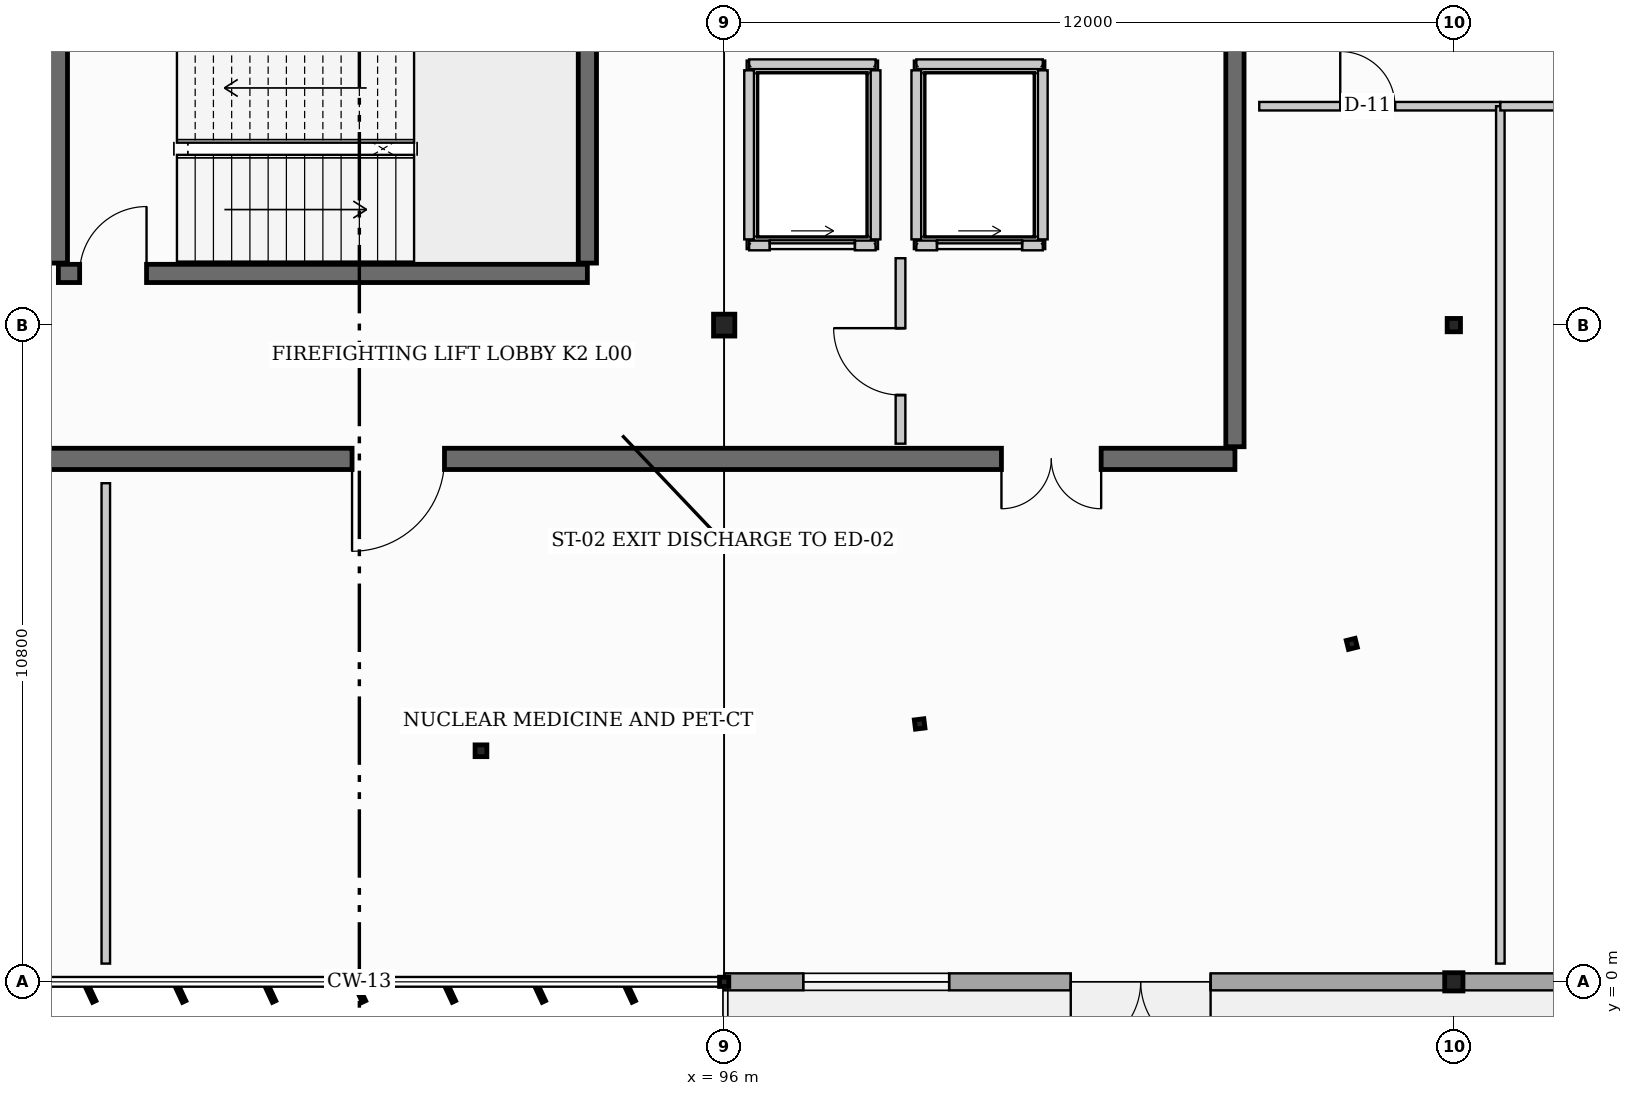
"""IFC4 building model, lengths in metres.
Left out: names, types, materials, properties, quantities, classifications, styles, units other than length and angle.
Written with IfcOpenShell. Run it as: python <this file> out.ifc"""

import sys

from ifc_helpers import new_model, si_unit, direction, frame, frame_2d, origin, origin_2d, place, context, subcontext, project, spatial, rectangle, hollow_rectangle, hollow_circle, i_section, extrude, element, fill, save


model = new_model("IFC4")
c1 = context("Model", 3, precision=1e-05, world=origin(), true_north=direction((0.0, 1.0)))
c2 = subcontext(c1, "Body", "Model", "MODEL_VIEW")
j1 = project(units=[si_unit("LENGTHUNIT", "METRE"), si_unit("PLANEANGLEUNIT", "RADIAN")], contexts=[c1])
p1 = place(None, origin())
s1 = spatial("IfcSite", under=j1, at=p1, CompositionType="ELEMENT")
p2 = place(p1, origin())
s2 = spatial("IfcBuilding", under=s1, at=p2, CompositionType="ELEMENT")
p3 = place(p2, origin())
s3 = spatial("IfcBuildingStorey", under=s2, at=p3, CompositionType="ELEMENT", Elevation=0.0)
p4 = place(p3, frame((96.0, 0.0, 0.0), z_axis=(0.0, 0.0, 1.0), x_axis=(1.0, 0.0, 0.0)))
e1 = element("IfcColumn", 1, at=p4, inside=s3, PredefinedType="COLUMN", context=c2, shape_type="SweptSolid", body=[
    extrude(i_section(OverallWidth=0.152, OverallDepth=0.152, WebThickness=0.006, FlangeThickness=0.007, at=origin_2d()), origin(), (0.0, 0.0, 1.0), 4.8),
])
p5 = place(p3, frame((96.0, 10.8, 0.0), z_axis=(0.0, 0.0, 1.0), x_axis=(1.0, 0.0, 0.0)))
e2 = element("IfcColumn", 2, at=p5, inside=s3, PredefinedType="COLUMN", context=c2, shape_type="SweptSolid", body=[
    extrude(i_section(OverallWidth=0.35, OverallDepth=0.36, WebThickness=0.016, FlangeThickness=0.028, at=origin_2d()), origin(), (0.0, 0.0, 1.0), 4.8),
])
p6 = place(p3, frame((108.0, 0.0, 0.0), z_axis=(0.0, 0.0, 1.0), x_axis=(0.0, 1.0, 0.0)))
e3 = element("IfcColumn", 3, at=p6, inside=s3, PredefinedType="COLUMN", context=c2, shape_type="SweptSolid", body=[
    extrude(hollow_rectangle(XDim=0.3, YDim=0.3, WallThickness=0.012, at=origin_2d()), origin(), (0.0, 0.0, 1.0), 4.8),
])
p7 = place(p3, frame((108.0, 10.8, 0.0), z_axis=(0.0, 0.0, 1.0), x_axis=(0.0, 1.0, 0.0)))
e4 = element("IfcColumn", 4, at=p7, inside=s3, PredefinedType="COLUMN", context=c2, shape_type="SweptSolid", body=[
    extrude(hollow_circle(Radius=0.11, WallThickness=0.01, at=origin_2d()), origin(), (0.0, 0.0, 1.0), 4.8),
])
p8 = place(p3, frame((92.0, 3.8, 0.0), z_axis=(0.0, 0.0, 1.0), x_axis=(0.0, 1.0, 0.0)))
e5 = element("IfcColumn", 5, at=p8, inside=s3, PredefinedType="COLUMN", context=c2, shape_type="SweptSolid", body=[
    extrude(hollow_circle(Radius=0.097, WallThickness=0.008, at=origin_2d()), origin(), (0.0, 0.0, 1.0), 4.8),
])
p9 = place(p3, frame((99.215, 4.241, 0.0), z_axis=(0.0, 0.0, 1.0), x_axis=(-0.121869343405, 0.992546151641, 0.0)))
e6 = element("IfcColumn", 6, at=p9, inside=s3, PredefinedType="COLUMN", context=c2, shape_type="SweptSolid", body=[
    extrude(i_section(OverallWidth=0.153, OverallDepth=0.158, WebThickness=0.007, FlangeThickness=0.01, at=origin_2d()), origin(), (0.0, 0.0, 1.0), 4.8),
])
p10 = place(p3, frame((106.322, 5.558, 0.0), z_axis=(0.0, 0.0, 1.0), x_axis=(-0.2419218956, 0.970295726276, 0.0)))
e7 = element("IfcColumn", 7, at=p10, inside=s3, PredefinedType="COLUMN", context=c2, shape_type="SweptSolid", body=[
    extrude(hollow_rectangle(XDim=0.15, YDim=0.15, WallThickness=0.008, at=origin_2d()), origin(), (0.0, 0.0, 1.0), 4.8),
])
p11 = place(p3, frame((104.4, 8.6, 0.0), z_axis=(0.0, 0.0, 1.0), x_axis=(-1.0, 0.0, 0.0)))
e8 = element("IfcWall", 8, at=p11, inside=s3, PredefinedType="SHEAR", context=c2, shape_type="SweptSolid", body=[
    extrude(rectangle(XDim=20.4, YDim=0.35, at=frame_2d((10.2, 0.0))), origin(), (0.0, 0.0, 1.0), 4.8),
])
p12 = place(p11, frame((2.2, 0.0, 0.0)))
e9 = element("IfcOpeningElement", 9, at=p12, cuts=e8, PredefinedType="OPENING", context=c2, shape_type="SweptSolid", body=[
    extrude(rectangle(XDim=1.64, YDim=2.2, at=frame_2d((0.82, 1.1))), frame((0.0, 0.185, 0.0), z_axis=(0.0, -1.0, 0.0), x_axis=(1.0, 0.0, 0.0)), (0.0, 0.0, 1.0), 0.37),
])
p13 = place(p11, frame((13.0, 0.0, 0.0)))
e10 = element("IfcOpeningElement", 10, at=p13, cuts=e8, PredefinedType="OPENING", context=c2, shape_type="SweptSolid", body=[
    extrude(rectangle(XDim=1.52, YDim=2.16, at=frame_2d((0.76, 1.08))), frame((0.0, 0.185, 0.0), z_axis=(0.0, -1.0, 0.0), x_axis=(1.0, 0.0, 0.0)), (0.0, 0.0, 1.0), 0.37),
])
p14 = place(p3, frame((104.4, 19.4, 0.0), z_axis=(0.0, 0.0, 1.0), x_axis=(0.0, -1.0, 0.0)))
e11 = element("IfcWall", 11, at=p14, inside=s3, PredefinedType="SHEAR", context=c2, shape_type="SweptSolid", body=[
    extrude(rectangle(XDim=10.6, YDim=0.3, at=frame_2d((5.3, 0.0))), origin(), (0.0, 0.0, 1.0), 4.8),
])
p15 = place(p3, frame((85.05, 11.65, 0.0), z_axis=(0.0, 0.0, 1.0), x_axis=(1.0, 0.0, 0.0)))
e12 = element("IfcWall", 12, at=p15, inside=s3, PredefinedType="SHEAR", context=c2, shape_type="SweptSolid", body=[
    extrude(rectangle(XDim=8.7, YDim=0.3, at=frame_2d((4.35, 0.0))), origin(), (0.0, 0.0, 1.0), 4.8),
])
p16 = place(p15, frame((0.35, 0.0, 0.0)))
e13 = element("IfcOpeningElement", 13, at=p16, cuts=e12, PredefinedType="OPENING", context=c2, shape_type="SweptSolid", body=[
    extrude(rectangle(XDim=1.1, YDim=2.15, at=frame_2d((0.55, 1.075))), frame((0.0, 0.16, 0.0), z_axis=(0.0, -1.0, 0.0), x_axis=(1.0, 0.0, 0.0)), (0.0, 0.0, 1.0), 0.32),
])
for number, where, z_axis, x_axis in (
    (14, (85.05, 11.82, 0.0), (0.0, 0.0, 1.0), (0.0, 1.0, 0.0)),
    (15, (93.75, 11.82, 0.0), (0.0, 0.0, 1.0), (0.0, 1.0, 0.0)),
):
    element("IfcWall", number, at=place(p3, frame(where, z_axis=z_axis, x_axis=x_axis)), inside=s3, PredefinedType="SHEAR", context=c2, shape_type="SweptSolid", body=[
        extrude(rectangle(XDim=3.76, YDim=0.3, at=frame_2d((1.88, 0.0))), origin(), (0.0, 0.0, 1.0), 4.8),
    ])
p17 = place(p3, frame((132.0, 0.0, 0.0), z_axis=(0.0, 0.0, 1.0), x_axis=(-1.0, 0.0, 0.0)))
e16 = element("IfcWall", 16, at=p17, inside=s3, PredefinedType="STANDARD", context=c2, shape_type="SweptSolid", body=[
    extrude(rectangle(XDim=36.0, YDim=0.28, at=frame_2d((18.0, 0.0))), origin(), (0.0, 0.0, 1.0), 3.53),
])
p18 = place(p17, frame((5.0, 0.0, 0.0)))
e17 = element("IfcOpeningElement", 17, at=p18, cuts=e16, PredefinedType="OPENING", context=c2, shape_type="SweptSolid", body=[
    extrude(rectangle(XDim=2.3, YDim=2.3, at=frame_2d((1.15, 1.15))), frame((0.0, 0.15, 0.0), z_axis=(0.0, -1.0, 0.0), x_axis=(1.0, 0.0, 0.0)), (0.0, 0.0, 1.0), 0.3),
])
p19 = place(p17, frame((16.5, 0.0, 0.0)))
e18 = element("IfcOpeningElement", 18, at=p19, cuts=e16, PredefinedType="OPENING", context=c2, shape_type="SweptSolid", body=[
    extrude(rectangle(XDim=2.3, YDim=2.3, at=frame_2d((1.15, 1.15))), frame((0.0, 0.15, 0.0), z_axis=(0.0, -1.0, 0.0), x_axis=(1.0, 0.0, 0.0)), (0.0, 0.0, 1.0), 0.3),
])
p20 = place(p17, frame((28.0, 0.0, 0.0)))
e19 = element("IfcOpeningElement", 19, at=p20, cuts=e16, PredefinedType="OPENING", context=c2, shape_type="SweptSolid", body=[
    extrude(rectangle(XDim=2.3, YDim=2.3, at=frame_2d((1.15, 1.15))), frame((0.0, 0.15, 0.0), z_axis=(0.0, -1.0, 0.0), x_axis=(1.0, 0.0, 0.0)), (0.0, 0.0, 1.0), 0.3),
])
p21 = place(p17, frame((1.1, 0.0, 0.95)))
e20 = element("IfcOpeningElement", 20, at=p21, cuts=e16, PredefinedType="OPENING", context=c2, shape_type="SweptSolid", body=[
    extrude(rectangle(XDim=2.4, YDim=0.9, at=frame_2d((1.2, 0.45))), frame((0.0, 0.15, 0.0), z_axis=(0.0, -1.0, 0.0), x_axis=(1.0, 0.0, 0.0)), (0.0, 0.0, 1.0), 0.3),
])
p22 = place(p17, frame((32.3, 0.0, 0.95)))
e21 = element("IfcOpeningElement", 21, at=p22, cuts=e16, PredefinedType="OPENING", context=c2, shape_type="SweptSolid", body=[
    extrude(rectangle(XDim=2.4, YDim=0.9, at=frame_2d((1.2, 0.45))), frame((0.0, 0.15, 0.0), z_axis=(0.0, -1.0, 0.0), x_axis=(1.0, 0.0, 0.0)), (0.0, 0.0, 1.0), 0.3),
])
p23 = place(p3, frame((96.41, 12.11, 0.0), z_axis=(0.0, 0.0, 1.0), x_axis=(1.0, 0.0, 0.0)))
e22 = element("IfcWall", 22, at=p23, inside=s3, PredefinedType="PARTITIONING", context=c2, shape_type="SweptSolid", body=[
    extrude(rectangle(XDim=2.08, YDim=0.16, at=frame_2d((1.04, 0.0))), origin(), (0.0, 0.0, 1.0), 4.445),
])
p24 = place(p23, frame((0.34, 0.0, 0.0)))
e23 = element("IfcOpeningElement", 23, at=p24, cuts=e22, PredefinedType="OPENING", context=c2, shape_type="SweptSolid", body=[
    extrude(rectangle(XDim=1.4, YDim=2.2, at=frame_2d((0.7, 1.1))), frame((0.0, 0.09, 0.0), z_axis=(0.0, -1.0, 0.0), x_axis=(1.0, 0.0, 0.0)), (0.0, 0.0, 1.0), 0.18),
])
p25 = place(p3, frame((98.49, 15.09, 0.0), z_axis=(0.0, 0.0, 1.0), x_axis=(-1.0, 0.0, 0.0)))
e24 = element("IfcWall", 24, at=p25, inside=s3, PredefinedType="PARTITIONING", context=c2, shape_type="SweptSolid", body=[
    extrude(rectangle(XDim=2.08, YDim=0.16, at=frame_2d((1.04, 0.0))), origin(), (0.0, 0.0, 1.0), 4.445),
])
for number, where, z_axis, x_axis in (
    (25, (96.41, 14.99, 0.0), (0.0, 0.0, 1.0), (0.0, -1.0, 0.0)),
    (26, (98.49, 12.21, 0.0), (0.0, 0.0, 1.0), (0.0, 1.0, 0.0)),
):
    element("IfcWall", number, at=place(p3, frame(where, z_axis=z_axis, x_axis=x_axis)), inside=s3, PredefinedType="PARTITIONING", context=c2, shape_type="SweptSolid", body=[
        extrude(rectangle(XDim=2.78, YDim=0.16, at=frame_2d((1.39, 0.0))), origin(), (0.0, 0.0, 1.0), 4.445),
    ])
p26 = place(p3, frame((99.16, 12.11, 0.0), z_axis=(0.0, 0.0, 1.0), x_axis=(1.0, 0.0, 0.0)))
e27 = element("IfcWall", 27, at=p26, inside=s3, PredefinedType="PARTITIONING", context=c2, shape_type="SweptSolid", body=[
    extrude(rectangle(XDim=2.08, YDim=0.16, at=frame_2d((1.04, 0.0))), origin(), (0.0, 0.0, 1.0), 4.445),
])
p27 = place(p26, frame((0.34, 0.0, 0.0)))
e28 = element("IfcOpeningElement", 28, at=p27, cuts=e27, PredefinedType="OPENING", context=c2, shape_type="SweptSolid", body=[
    extrude(rectangle(XDim=1.4, YDim=2.2, at=frame_2d((0.7, 1.1))), frame((0.0, 0.09, 0.0), z_axis=(0.0, -1.0, 0.0), x_axis=(1.0, 0.0, 0.0)), (0.0, 0.0, 1.0), 0.18),
])
p28 = place(p3, frame((101.24, 15.09, 0.0), z_axis=(0.0, 0.0, 1.0), x_axis=(-1.0, 0.0, 0.0)))
e29 = element("IfcWall", 29, at=p28, inside=s3, PredefinedType="PARTITIONING", context=c2, shape_type="SweptSolid", body=[
    extrude(rectangle(XDim=2.08, YDim=0.16, at=frame_2d((1.04, 0.0))), origin(), (0.0, 0.0, 1.0), 4.445),
])
for number, where, z_axis, x_axis in (
    (30, (99.16, 14.99, 0.0), (0.0, 0.0, 1.0), (0.0, -1.0, 0.0)),
    (31, (101.24, 12.21, 0.0), (0.0, 0.0, 1.0), (0.0, 1.0, 0.0)),
):
    element("IfcWall", number, at=place(p3, frame(where, z_axis=z_axis, x_axis=x_axis)), inside=s3, PredefinedType="PARTITIONING", context=c2, shape_type="SweptSolid", body=[
        extrude(rectangle(XDim=2.78, YDim=0.16, at=frame_2d((1.39, 0.0))), origin(), (0.0, 0.0, 1.0), 4.445),
    ])
p29 = place(p3, frame((98.9, 8.85, 0.0), z_axis=(0.0, 0.0, 1.0), x_axis=(0.0, 1.0, 0.0)))
e32 = element("IfcWall", 32, at=p29, inside=s3, PredefinedType="PARTITIONING", context=c2, shape_type="SweptSolid", body=[
    extrude(rectangle(XDim=3.05, YDim=0.16, at=frame_2d((1.525, 0.0))), origin(), (0.0, 0.0, 1.0), 3.976),
])
p30 = place(p29, frame((0.8, 0.0, 0.0)))
e33 = element("IfcOpeningElement", 33, at=p30, cuts=e32, PredefinedType="OPENING", context=c2, shape_type="SweptSolid", body=[
    extrude(rectangle(XDim=1.1, YDim=2.15, at=frame_2d((0.55, 1.075))), frame((0.0, 0.09, 0.0), z_axis=(0.0, -1.0, 0.0), x_axis=(1.0, 0.0, 0.0)), (0.0, 0.0, 1.0), 0.18),
])
p31 = place(p3, frame((85.83, 0.3, 0.0), z_axis=(0.0, 0.0, 1.0), x_axis=(0.0, 1.0, 0.0)))
e34 = element("IfcWall", 34, at=p31, inside=s3, PredefinedType="PARTITIONING", context=c2, shape_type="SweptSolid", body=[
    extrude(rectangle(XDim=7.9, YDim=0.14, at=frame_2d((3.95, 0.0))), origin(), (0.0, 0.0, 1.0), 4.174),
])
p32 = place(p3, frame((104.8, 14.4, 0.0), z_axis=(0.0, 0.0, 1.0), x_axis=(1.0, 0.0, 0.0)))
e35 = element("IfcWall", 35, at=p32, inside=s3, PredefinedType="PARTITIONING", context=c2, shape_type="SweptSolid", body=[
    extrude(rectangle(XDim=3.965, YDim=0.14, at=frame_2d((1.982, 0.0))), origin(), (0.0, 0.0, 1.0), 4.445),
])
p33 = place(p32, frame((1.332, 0.0, 0.0)))
e36 = element("IfcOpeningElement", 36, at=p33, cuts=e35, PredefinedType="OPENING", context=c2, shape_type="SweptSolid", body=[
    extrude(rectangle(XDim=0.9, YDim=2.1, at=frame_2d((0.45, 1.05))), frame((0.0, 0.08, 0.0), z_axis=(0.0, -1.0, 0.0), x_axis=(1.0, 0.0, 0.0)), (0.0, 0.0, 1.0), 0.16),
])
p34 = place(p3, frame((108.765, 0.3, 0.0), z_axis=(0.0, 0.0, 1.0), x_axis=(0.0, 1.0, 0.0)))
e37 = element("IfcWall", 37, at=p34, inside=s3, PredefinedType="PARTITIONING", context=c2, shape_type="SweptSolid", body=[
    extrude(rectangle(XDim=14.1, YDim=0.14, at=frame_2d((7.05, 0.0))), origin(), (0.0, 0.0, 1.0), 4.027),
])
p35 = place(p3, frame((108.765, 14.4, 0.0), z_axis=(0.0, 0.0, 1.0), x_axis=(1.0, 0.0, 0.0)))
e38 = element("IfcWall", 38, at=p35, inside=s3, PredefinedType="PARTITIONING", context=c2, shape_type="SweptSolid", body=[
    extrude(rectangle(XDim=22.935, YDim=0.14, at=frame_2d((11.468, 0.0))), origin(), (0.0, 0.0, 1.0), 3.738),
])
p36 = place(p35, frame((10.817, 0.0, 0.0)))
e39 = element("IfcOpeningElement", 39, at=p36, cuts=e38, PredefinedType="OPENING", context=c2, shape_type="SweptSolid", body=[
    extrude(rectangle(XDim=0.92, YDim=2.04, at=frame_2d((0.46, 1.02))), frame((0.0, 0.08, 0.0), z_axis=(0.0, -1.0, 0.0), x_axis=(1.0, 0.0, 0.0)), (0.0, 0.0, 1.0), 0.16),
])
p37 = place(p20, origin())
e40 = element("IfcDoor", 40, at=p37, inside=s3, OperationType="DOUBLE_DOOR_SINGLE_SWING", PredefinedType="DOOR", context=c2, shape_type="SweptSolid", body=[
    extrude(rectangle(XDim=2.3, YDim=2.3, at=frame_2d((1.15, 1.15))), frame((0.0, 0.025, 0.0), z_axis=(0.0, -1.0, 0.0), x_axis=(1.0, 0.0, 0.0)), (0.0, 0.0, 1.0), 0.05),
])
fill(e19, e40)
p38 = place(p22, origin())
e41 = element("IfcWindow", 41, at=p38, inside=s3, PartitioningType="DOUBLE_PANEL_HORIZONTAL", PredefinedType="WINDOW", context=c2, shape_type="SweptSolid", body=[
    extrude(rectangle(XDim=2.4, YDim=0.9, at=frame_2d((1.2, 0.45))), frame((0.0, 0.03, 0.0), z_axis=(0.0, -1.0, 0.0), x_axis=(1.0, 0.0, 0.0)), (0.0, 0.0, 1.0), 0.06),
])
fill(e21, e41)
p39 = place(p24, origin())
e42 = element("IfcDoor", 42, at=p39, inside=s3, OperationType="SLIDING_TO_RIGHT", PredefinedType="DOOR", context=c2, shape_type="SweptSolid", body=[
    extrude(rectangle(XDim=1.4, YDim=2.2, at=frame_2d((0.7, 1.1))), frame((0.0, 0.025, 0.0), z_axis=(0.0, -1.0, 0.0), x_axis=(1.0, 0.0, 0.0)), (0.0, 0.0, 1.0), 0.05),
])
fill(e23, e42)
p40 = place(p27, origin())
e43 = element("IfcDoor", 43, at=p40, inside=s3, OperationType="SLIDING_TO_RIGHT", PredefinedType="DOOR", context=c2, shape_type="SweptSolid", body=[
    extrude(rectangle(XDim=1.4, YDim=2.2, at=frame_2d((0.7, 1.1))), frame((0.0, 0.025, 0.0), z_axis=(0.0, -1.0, 0.0), x_axis=(1.0, 0.0, 0.0)), (0.0, 0.0, 1.0), 0.05),
])
fill(e28, e43)
p41 = place(p16, origin())
e44 = element("IfcDoor", 44, at=p41, inside=s3, OperationType="SINGLE_SWING_RIGHT", PredefinedType="DOOR", context=c2, shape_type="SweptSolid", body=[
    extrude(rectangle(XDim=1.1, YDim=2.15, at=frame_2d((0.55, 1.075))), frame((0.0, 0.025, 0.0), z_axis=(0.0, -1.0, 0.0), x_axis=(1.0, 0.0, 0.0)), (0.0, 0.0, 1.0), 0.05),
])
fill(e13, e44)
p42 = place(p12, origin())
e45 = element("IfcDoor", 45, at=p42, inside=s3, OperationType="DOUBLE_DOOR_SINGLE_SWING", PredefinedType="DOOR", context=c2, shape_type="SweptSolid", body=[
    extrude(rectangle(XDim=1.64, YDim=2.2, at=frame_2d((0.82, 1.1))), frame((0.0, 0.025, 0.0), z_axis=(0.0, -1.0, 0.0), x_axis=(1.0, 0.0, 0.0)), (0.0, 0.0, 1.0), 0.05),
])
fill(e9, e45)
p43 = place(p13, origin())
e46 = element("IfcDoor", 46, at=p43, inside=s3, OperationType="SINGLE_SWING_RIGHT", PredefinedType="DOOR", context=c2, shape_type="SweptSolid", body=[
    extrude(rectangle(XDim=1.52, YDim=2.16, at=frame_2d((0.76, 1.08))), frame((0.0, 0.025, 0.0), z_axis=(0.0, -1.0, 0.0), x_axis=(1.0, 0.0, 0.0)), (0.0, 0.0, 1.0), 0.05),
])
fill(e10, e46)
p44 = place(p30, origin())
e47 = element("IfcDoor", 47, at=p44, inside=s3, OperationType="SINGLE_SWING_RIGHT", PredefinedType="DOOR", context=c2, shape_type="SweptSolid", body=[
    extrude(rectangle(XDim=1.1, YDim=2.15, at=frame_2d((0.55, 1.075))), frame((0.0, 0.025, 0.0), z_axis=(0.0, -1.0, 0.0), x_axis=(1.0, 0.0, 0.0)), (0.0, 0.0, 1.0), 0.05),
])
fill(e33, e47)
p45 = place(p33, origin())
e48 = element("IfcDoor", 48, at=p45, inside=s3, OperationType="SINGLE_SWING_LEFT", PredefinedType="DOOR", context=c2, shape_type="SweptSolid", body=[
    extrude(rectangle(XDim=0.9, YDim=2.1, at=frame_2d((0.45, 1.05))), frame((0.0, 0.025, 0.0), z_axis=(0.0, -1.0, 0.0), x_axis=(1.0, 0.0, 0.0)), (0.0, 0.0, 1.0), 0.05),
])
fill(e36, e48)
save(model, sys.argv[1])
